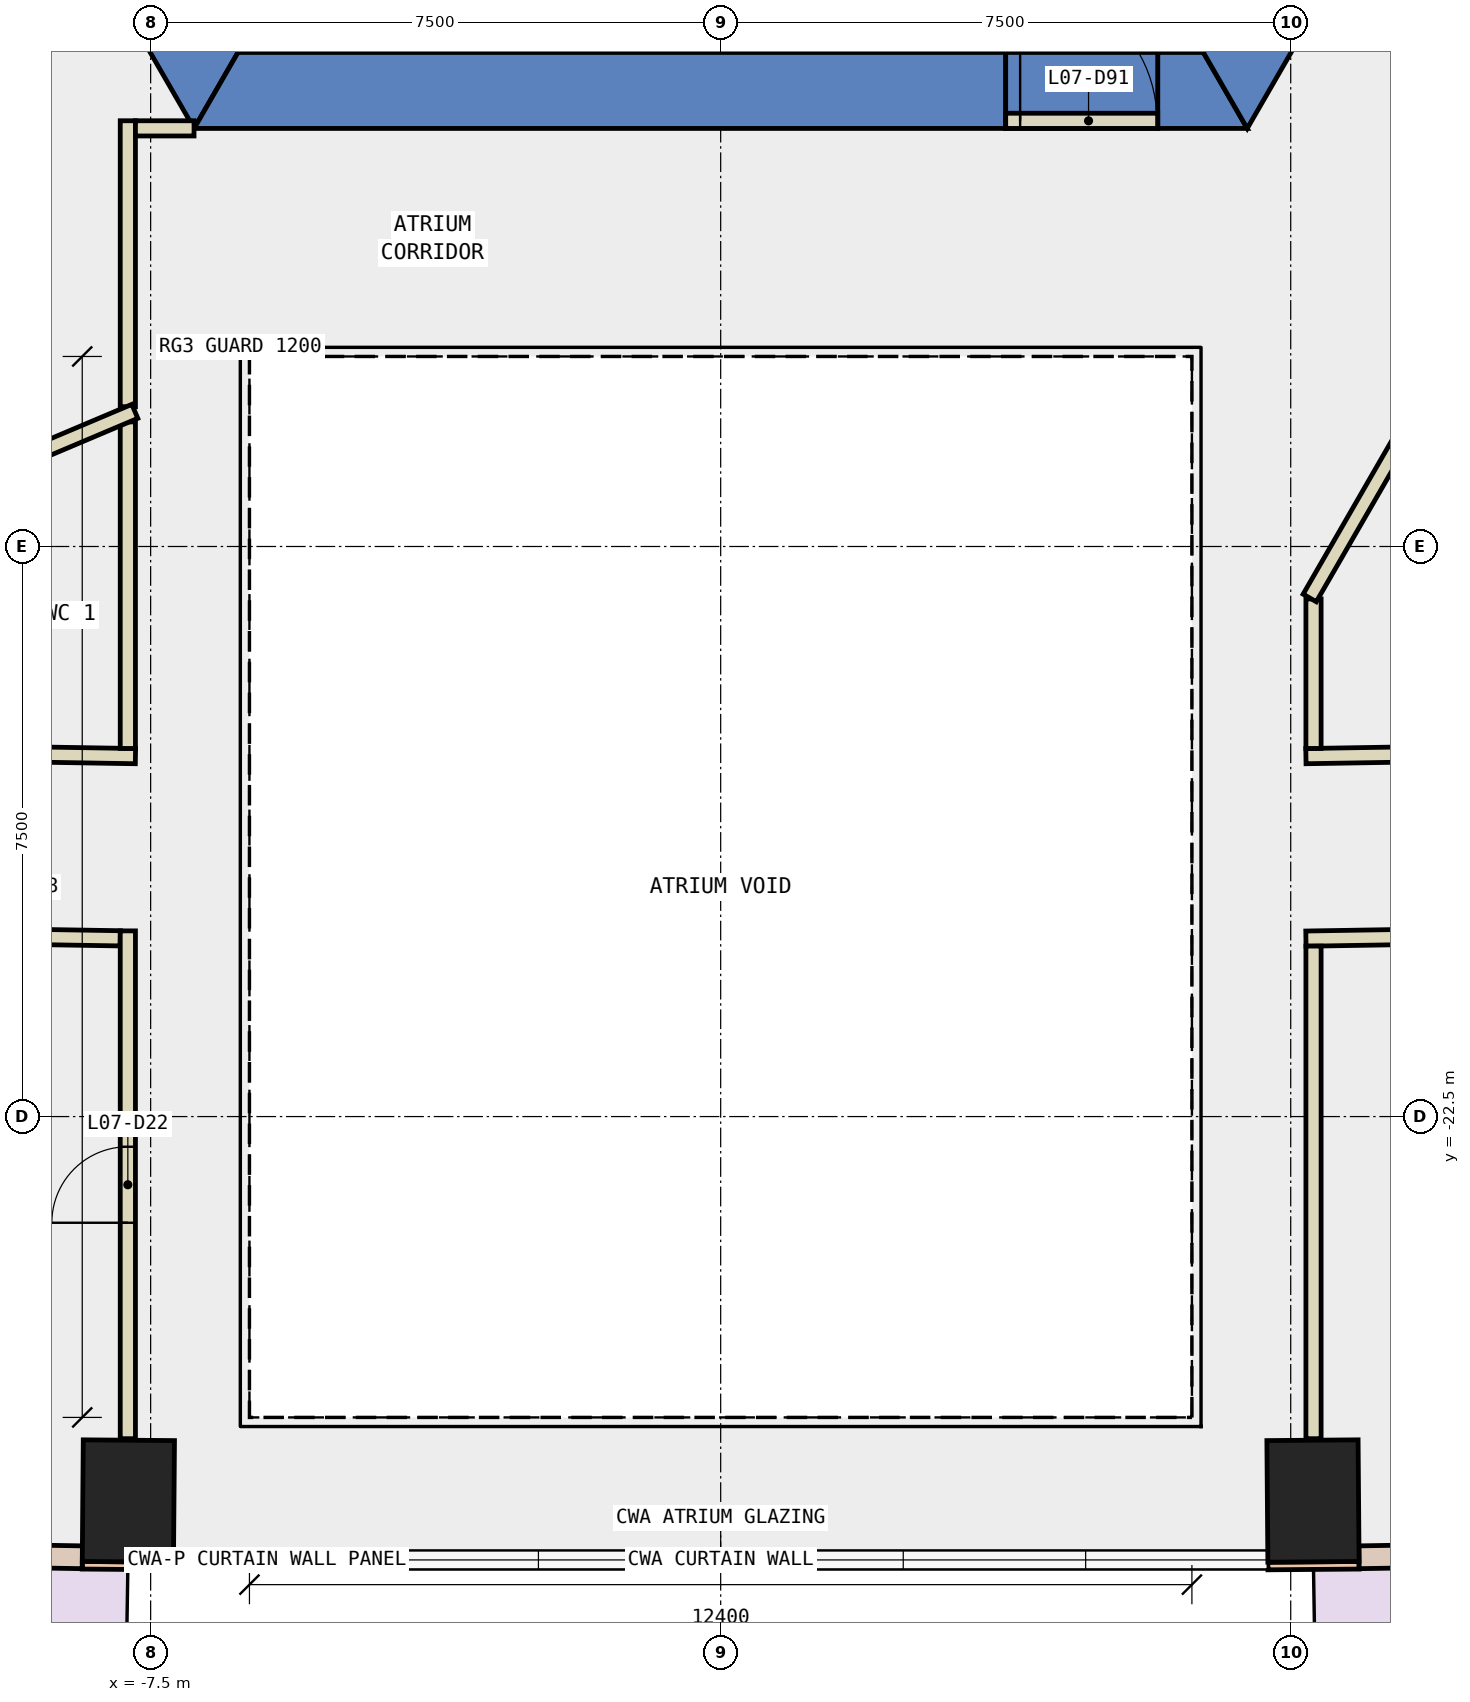
"""IFC4 building model, lengths in metres.
Left out: names, types, materials, properties, quantities, classifications, styles, units other than length and angle.
Written with IfcOpenShell. Run it as: python <this file> out.ifc"""

import sys

from ifc_helpers import new_model, si_unit, direction, frame, frame_2d, origin, origin_2d, place, context, subcontext, project, spatial, polyline, rectangle, outline, extrude, element, fill, save


model = new_model("IFC4")
c1 = context("Model", 3, precision=1e-05, world=origin(), true_north=direction((0.0, 1.0)))
c2 = subcontext(c1, "Body", "Model", "MODEL_VIEW")
j1 = project(units=[si_unit("LENGTHUNIT", "METRE"), si_unit("PLANEANGLEUNIT", "RADIAN")], contexts=[c1])
p1 = place(None, origin())
s1 = spatial("IfcSite", under=j1, at=p1, CompositionType="ELEMENT")
p2 = place(p1, origin())
s2 = spatial("IfcBuilding", under=s1, at=p2, CompositionType="ELEMENT")
p3 = place(p2, frame((0.0, 0.0, 39.2)))
s3 = spatial("IfcBuildingStorey", under=s2, at=p3, CompositionType="ELEMENT", Elevation=39.2)
for number, where, z_axis, x_axis in (
    (1, (-7.793, -27.558, -0.4), (0.0, 0.0, 1.0), (-1.0, 0.008, 0.0)),
    (2, (7.793, -27.558, -0.4), (0.0, 0.0, 1.0), (1.0, 0.008, 0.0)),
):
    element("IfcColumn", number, at=place(p3, frame(where, z_axis=z_axis, x_axis=x_axis)), inside=s3, PredefinedType="COLUMN", context=c2, shape_type="SweptSolid", body=[
        extrude(rectangle(XDim=1.2, YDim=1.6, at=origin_2d()), origin(), (0.0, 0.0, 1.0), 4.2),
    ])
p4 = place(p3, frame((0.0, 0.0, -0.4)))
e3 = element("IfcWall", 3, at=p4, inside=s3, PredefinedType="SHEAR", context=c2, shape_type="SweptSolid", body=[
    extrude(outline(polyline([(-13.856, 2.5), (-6.928, -9.5), (-6.351, -8.5), (-12.702, 2.5), (-13.856, 2.5)])), origin(), (0.0, 0.0, 1.0), 4.2),
])
p5 = place(p3, frame((0.0, 0.0, -0.4)))
e4 = element("IfcWall", 4, at=p5, inside=s3, PredefinedType="SHEAR", context=c2, shape_type="SweptSolid", body=[
    extrude(outline(polyline([(3.75, -9.5), (3.75, -8.5), (-6.351, -8.5), (-6.928, -9.5), (3.75, -9.5)])), origin(), (0.0, 0.0, 1.0), 4.2),
])
p6 = place(p3, frame((0.0, 0.0, -0.4)))
e5 = element("IfcWall", 5, at=p6, inside=s3, PredefinedType="SHEAR", context=c2, shape_type="SweptSolid", body=[
    extrude(outline(polyline([(5.75, -8.5), (5.75, -9.5), (6.928, -9.5), (6.351, -8.5), (5.75, -8.5)])), origin(), (0.0, 0.0, 1.0), 4.2),
])
p7 = place(p3, frame((0.0, 0.0, 3.6)))
e6 = element("IfcWall", 6, at=p7, inside=s3, PredefinedType="SHEAR", context=c2, shape_type="SweptSolid", body=[
    extrude(outline(polyline([(5.75, -9.5), (5.75, -8.5), (3.75, -8.5), (3.75, -9.5), (5.75, -9.5)])), origin(), (0.0, 0.0, 1.0), 0.2),
])
p8 = place(p3, frame((0.0, 0.0, -0.4)))
e7 = element("IfcWall", 7, at=p8, inside=s3, PredefinedType="SHEAR", context=c2, shape_type="SweptSolid", body=[
    extrude(outline(polyline([(8.117, -7.44), (7.252, -6.94), (6.351, -8.5), (6.928, -9.5), (8.117, -7.44)])), origin(), (0.0, 0.0, 1.0), 4.2),
])
for number, where, z_axis, x_axis in (
    (8, (-8.4, -28.403, 0.0), (0.0, 0.0, 1.0), (1.0, -0.008, 0.0)),
    (9, (7.2, -28.413, 0.0), (0.0, 0.0, 1.0), (1.0, 0.008, 0.0)),
):
    element("IfcWall", number, at=place(p3, frame(where, z_axis=z_axis, x_axis=x_axis)), inside=s3, PredefinedType="STANDARD", context=c2, shape_type="SweptSolid", body=[
        extrude(rectangle(XDim=1.2, YDim=0.1, at=frame_2d((0.6, 0.0))), origin(), (0.0, 0.0, 1.0), 3.8),
    ])
p9 = place(p3, frame((-15.568, -28.181, 0.0), z_axis=(0.0, 0.0, 1.0), x_axis=(0.999866467443, -0.016341581408, 0.0)))
e10 = element("IfcWall", 10, at=p9, inside=s3, PredefinedType="STANDARD", context=c2, shape_type="SweptSolid", body=[
    extrude(rectangle(XDim=7.171, YDim=0.3, at=frame_2d((3.585, 0.0))), origin(), (0.0, 0.0, 1.0), 3.8),
])
p10 = place(p9, frame((0.793, 0.0, 0.0)))
e11 = element("IfcOpeningElement", 11, at=p10, cuts=e10, PredefinedType="OPENING", context=c2, shape_type="SweptSolid", body=[
    extrude(rectangle(XDim=2.0, YDim=2.4, at=frame_2d((1.0, 1.2))), frame((0.0, 0.16, 0.0), z_axis=(0.0, -1.0, 0.0), x_axis=(1.0, 0.0, 0.0)), (0.0, 0.0, 1.0), 0.32),
])
p11 = place(p9, frame((4.178, 0.0, 0.9)))
e12 = element("IfcOpeningElement", 12, at=p11, cuts=e10, PredefinedType="OPENING", context=c2, shape_type="SweptSolid", body=[
    extrude(rectangle(XDim=2.4, YDim=2.6, at=frame_2d((1.2, 1.3))), frame((0.0, 0.16, 0.0), z_axis=(0.0, -1.0, 0.0), x_axis=(1.0, 0.0, 0.0)), (0.0, 0.0, 1.0), 0.32),
])
p12 = place(p3, frame((8.398, -28.298, 0.0), z_axis=(0.0, 0.0, 1.0), x_axis=(0.999866467443, 0.016341581408, 0.0)))
e13 = element("IfcWall", 13, at=p12, inside=s3, PredefinedType="STANDARD", context=c2, shape_type="SweptSolid", body=[
    extrude(rectangle(XDim=7.171, YDim=0.3, at=frame_2d((3.585, 0.0))), origin(), (0.0, 0.0, 1.0), 3.8),
])
p13 = place(p12, frame((0.793, 0.0, 0.0)))
e14 = element("IfcOpeningElement", 14, at=p13, cuts=e13, PredefinedType="OPENING", context=c2, shape_type="SweptSolid", body=[
    extrude(rectangle(XDim=2.0, YDim=2.4, at=frame_2d((1.0, 1.2))), frame((0.0, 0.16, 0.0), z_axis=(0.0, -1.0, 0.0), x_axis=(1.0, 0.0, 0.0)), (0.0, 0.0, 1.0), 0.32),
])
p14 = place(p12, frame((4.178, 0.0, 0.9)))
e15 = element("IfcOpeningElement", 15, at=p14, cuts=e13, PredefinedType="OPENING", context=c2, shape_type="SweptSolid", body=[
    extrude(rectangle(XDim=2.4, YDim=2.6, at=frame_2d((1.2, 1.3))), frame((0.0, 0.16, 0.0), z_axis=(0.0, -1.0, 0.0), x_axis=(1.0, 0.0, 0.0)), (0.0, 0.0, 1.0), 0.32),
])
p15 = place(p3, frame((7.7, -17.758, 0.0), z_axis=(0.0, 0.0, 1.0), x_axis=(0.999865574926, 0.016396099485, 0.0)))
e16 = element("IfcWall", 16, at=p15, inside=s3, PredefinedType="PARTITIONING", context=c2, shape_type="SweptSolid", body=[
    extrude(rectangle(XDim=8.234, YDim=0.2, at=frame_2d((4.117, 0.0))), origin(), (0.0, 0.0, 1.0), 3.8),
])
p16 = place(p3, frame((-15.73, -17.627, 0.0), z_axis=(0.0, 0.0, 1.0), x_axis=(0.999866746812, -0.016324479129, 0.0)))
e17 = element("IfcWall", 17, at=p16, inside=s3, PredefinedType="PARTITIONING", context=c2, shape_type="SweptSolid", body=[
    extrude(rectangle(XDim=8.031, YDim=0.2, at=frame_2d((4.016, 0.0))), origin(), (0.0, 0.0, 1.0), 3.8),
])
p17 = place(p16, frame((3.515, 0.0, 0.0)))
e18 = element("IfcOpeningElement", 18, at=p17, cuts=e17, PredefinedType="OPENING", context=c2, shape_type="SweptSolid", body=[
    extrude(rectangle(XDim=1.0, YDim=2.1, at=frame_2d((0.5, 1.05))), frame((0.0, 0.11, 0.0), z_axis=(0.0, -1.0, 0.0), x_axis=(1.0, 0.0, 0.0)), (0.0, 0.0, 1.0), 0.22),
])
p18 = place(p3, frame((16.061, -20.022, 0.0), z_axis=(0.0, 0.0, 1.0), x_axis=(-0.999865858466, -0.016378799504, 0.0)))
e19 = element("IfcWall", 19, at=p18, inside=s3, PredefinedType="PARTITIONING", context=c2, shape_type="SweptSolid", body=[
    extrude(rectangle(XDim=8.362, YDim=0.2, at=frame_2d((4.181, 0.0))), origin(), (0.0, 0.0, 1.0), 3.8),
])
p19 = place(p18, frame((3.681, 0.0, 0.0)))
e20 = element("IfcOpeningElement", 20, at=p19, cuts=e19, PredefinedType="OPENING", context=c2, shape_type="SweptSolid", body=[
    extrude(rectangle(XDim=1.0, YDim=2.1, at=frame_2d((0.5, 1.05))), frame((0.0, 0.11, 0.0), z_axis=(0.0, -1.0, 0.0), x_axis=(1.0, 0.0, 0.0)), (0.0, 0.0, 1.0), 0.22),
])
p20 = place(p3, frame((-7.9, -20.155, 0.0), z_axis=(0.0, 0.0, 1.0), x_axis=(-0.999867846419, 0.016256989184, 0.0)))
e21 = element("IfcWall", 21, at=p20, inside=s3, PredefinedType="PARTITIONING", context=c2, shape_type="SweptSolid", body=[
    extrude(rectangle(XDim=3.875, YDim=0.2, at=frame_2d((1.937, 0.0))), origin(), (0.0, 0.0, 1.0), 3.8),
])
p21 = place(p3, frame((7.8, -15.69, 0.0), z_axis=(0.0, 0.0, 1.0), x_axis=(0.0, -1.0, 0.0)))
e22 = element("IfcWall", 22, at=p21, inside=s3, PredefinedType="PARTITIONING", context=c2, shape_type="SweptSolid", body=[
    extrude(rectangle(XDim=1.967, YDim=0.2, at=frame_2d((0.983, 0.0))), origin(), (0.0, 0.0, 1.0), 3.8),
])
p22 = place(p3, frame((-7.8, -13.161, 0.0), z_axis=(0.0, 0.0, 1.0), x_axis=(0.0, 1.0, 0.0)))
e23 = element("IfcWall", 23, at=p22, inside=s3, PredefinedType="PARTITIONING", context=c2, shape_type="SweptSolid", body=[
    extrude(rectangle(XDim=3.762, YDim=0.2, at=frame_2d((1.881, 0.0))), origin(), (0.0, 0.0, 1.0), 3.8),
])
p23 = place(p3, frame((-7.7, -9.499, 0.0), z_axis=(0.0, 0.0, 1.0), x_axis=(1.0, 0.0, 0.0)))
e24 = element("IfcWall", 24, at=p23, inside=s3, PredefinedType="PARTITIONING", context=c2, shape_type="SweptSolid", body=[
    extrude(rectangle(XDim=0.771, YDim=0.2, at=frame_2d((0.385, 0.0))), origin(), (0.0, 0.0, 1.0), 3.8),
])
p24 = place(p3, frame((-7.8, -17.657, 0.0), z_axis=(0.0, 0.0, 1.0), x_axis=(0.0, 1.0, 0.0)))
e25 = element("IfcWall", 25, at=p24, inside=s3, PredefinedType="PARTITIONING", context=c2, shape_type="SweptSolid", body=[
    extrude(rectangle(XDim=4.296, YDim=0.2, at=frame_2d((2.148, 0.0))), origin(), (0.0, 0.0, 1.0), 3.8),
])
p25 = place(p3, frame((7.8, -20.257, 0.0), z_axis=(0.0, 0.0, 1.0), x_axis=(0.0, -1.0, 0.0)))
e26 = element("IfcWall", 26, at=p25, inside=s3, PredefinedType="PARTITIONING", context=c2, shape_type="SweptSolid", body=[
    extrude(rectangle(XDim=6.481, YDim=0.2, at=frame_2d((3.24, 0.0))), origin(), (0.0, 0.0, 1.0), 3.8),
])
p26 = place(p3, frame((-7.8, -26.738, 0.0), z_axis=(0.0, 0.0, 1.0), x_axis=(0.0, 1.0, 0.0)))
e27 = element("IfcWall", 27, at=p26, inside=s3, PredefinedType="PARTITIONING", context=c2, shape_type="SweptSolid", body=[
    extrude(rectangle(XDim=6.681, YDim=0.2, at=frame_2d((3.341, 0.0))), origin(), (0.0, 0.0, 1.0), 3.8),
])
p27 = place(p26, frame((2.841, 0.0, 0.0)))
e28 = element("IfcOpeningElement", 28, at=p27, cuts=e27, PredefinedType="OPENING", context=c2, shape_type="SweptSolid", body=[
    extrude(rectangle(XDim=1.0, YDim=2.1, at=frame_2d((0.5, 1.05))), frame((0.0, 0.11, 0.0), z_axis=(0.0, -1.0, 0.0), x_axis=(1.0, 0.0, 0.0)), (0.0, 0.0, 1.0), 0.22),
])
p28 = place(p3, frame((-7.708, -13.222, 0.0), z_axis=(0.0, 0.0, 1.0), x_axis=(-0.921093468555, -0.389341523839, 0.0)))
e29 = element("IfcWall", 29, at=p28, inside=s3, PredefinedType="PARTITIONING", context=c2, shape_type="SweptSolid", body=[
    extrude(rectangle(XDim=9.233, YDim=0.2, at=frame_2d((4.617, 0.0))), origin(), (0.0, 0.0, 1.0), 3.8),
])
p29 = place(p3, frame((3.75, -9.4, 0.0), z_axis=(0.0, 0.0, 1.0), x_axis=(1.0, 0.0, 0.0)))
e30 = element("IfcWall", 30, at=p29, inside=s3, PredefinedType="PARTITIONING", context=c2, shape_type="SweptSolid", body=[
    extrude(rectangle(XDim=2.0, YDim=0.2, at=frame_2d((1.0, 0.0))), origin(), (0.0, 0.0, 1.0), 2.4),
])
p30 = place(p29, frame((0.19, 0.0, 0.0)))
e31 = element("IfcOpeningElement", 31, at=p30, cuts=e30, PredefinedType="OPENING", context=c2, shape_type="SweptSolid", body=[
    extrude(rectangle(XDim=1.8, YDim=2.1, at=frame_2d((0.9, 1.05))), frame((0.0, 0.11, 0.0), z_axis=(0.0, -1.0, 0.0), x_axis=(1.0, 0.0, 0.0)), (0.0, 0.0, 1.0), 0.22),
])
p31 = place(p3, frame((12.401, -7.621, 0.0), z_axis=(0.0, 0.0, 1.0), x_axis=(-0.499983724212, -0.866034800411, 0.0)))
e32 = element("IfcWall", 32, at=p31, inside=s3, PredefinedType="PARTITIONING", context=c2, shape_type="SweptSolid", body=[
    extrude(rectangle(XDim=9.302, YDim=0.2, at=frame_2d((4.651, 0.0))), origin(), (0.0, 0.0, 1.0), 3.8),
])
p32 = place(p31, frame((1.429, 0.0, 0.0)))
e33 = element("IfcOpeningElement", 33, at=p32, cuts=e32, PredefinedType="OPENING", context=c2, shape_type="SweptSolid", body=[
    extrude(rectangle(XDim=1.0, YDim=2.1, at=frame_2d((0.5, 1.05))), frame((0.0, 0.11, 0.0), z_axis=(0.0, -1.0, 0.0), x_axis=(1.0, 0.0, 0.0)), (0.0, 0.0, 1.0), 0.22),
])
p33 = place(p31, frame((2.529, 0.0, 0.0)))
e34 = element("IfcOpeningElement", 34, at=p33, cuts=e32, PredefinedType="OPENING", context=c2, shape_type="SweptSolid", body=[
    extrude(rectangle(XDim=1.0, YDim=2.1, at=frame_2d((0.5, 1.05))), frame((0.0, 0.11, 0.0), z_axis=(0.0, -1.0, 0.0), x_axis=(1.0, 0.0, 0.0)), (0.0, 0.0, 1.0), 0.22),
])
p34 = place(p27, origin())
e35 = element("IfcDoor", 35, at=p34, inside=s3, OperationType="SINGLE_SWING_LEFT", PredefinedType="DOOR", context=c2, shape_type="SweptSolid", body=[
    extrude(rectangle(XDim=1.0, YDim=2.1, at=frame_2d((0.5, 1.05))), frame((0.0, 0.025, 0.0), z_axis=(0.0, -1.0, 0.0), x_axis=(1.0, 0.0, 0.0)), (0.0, 0.0, 1.0), 0.05),
])
fill(e28, e35)
p35 = place(p30, origin())
e36 = element("IfcDoor", 36, at=p35, inside=s3, OperationType="DOUBLE_DOOR_SINGLE_SWING", PredefinedType="DOOR", context=c2, shape_type="SweptSolid", body=[
    extrude(rectangle(XDim=1.8, YDim=2.1, at=frame_2d((0.9, 1.05))), frame((0.0, 0.025, 0.0), z_axis=(0.0, -1.0, 0.0), x_axis=(1.0, 0.0, 0.0)), (0.0, 0.0, 1.0), 0.05),
])
fill(e31, e36)
save(model, sys.argv[1])
